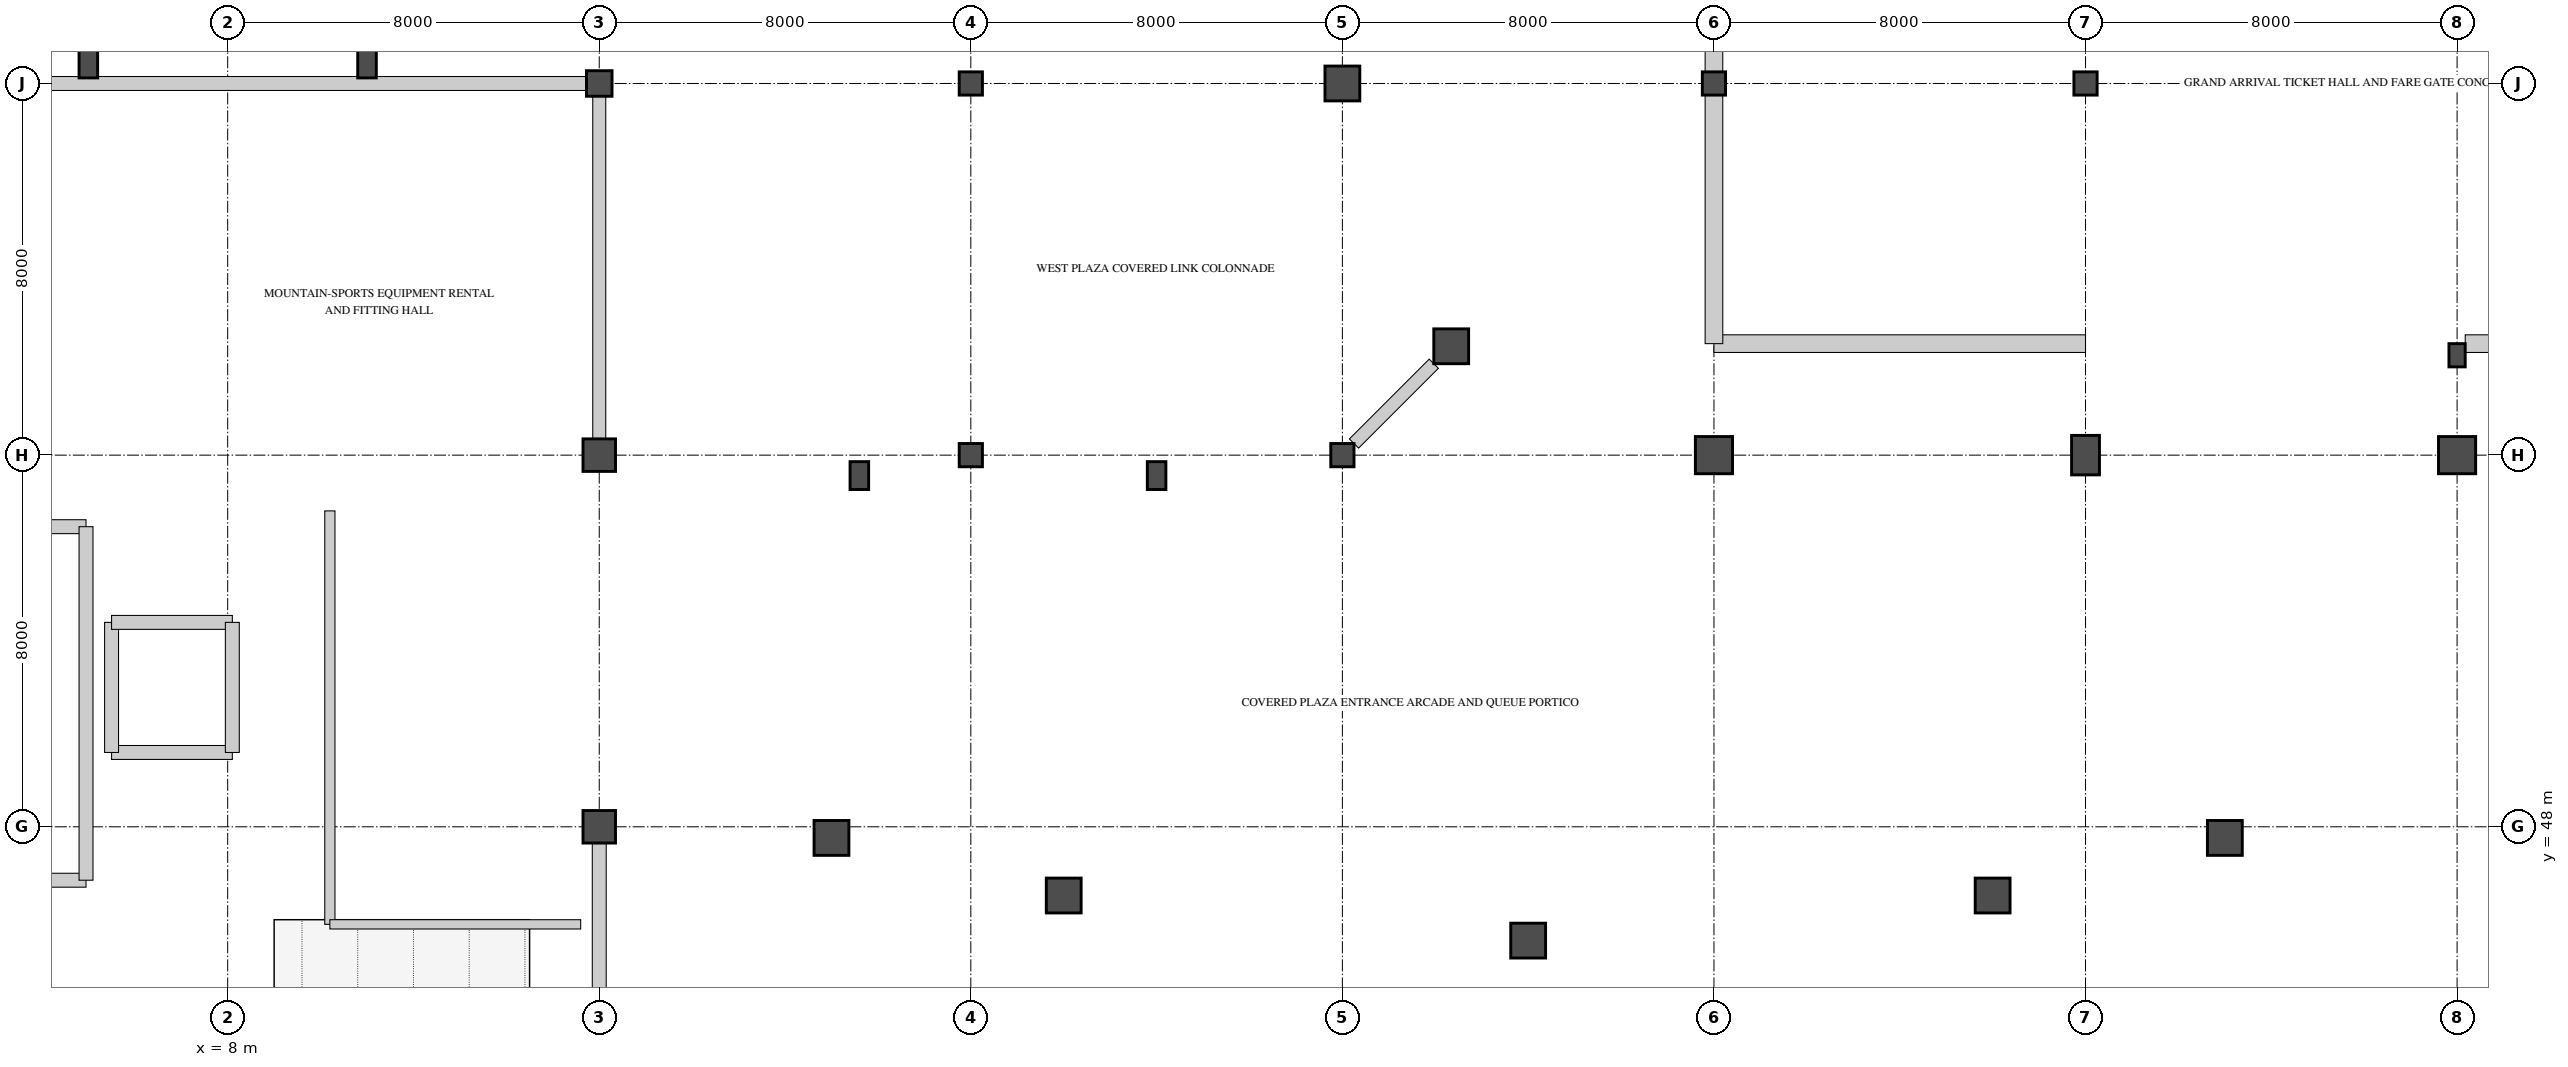
"""IFC4 building model, lengths in metres.
Left out: names, types, materials, properties, quantities, classifications, styles, units other than length and angle.
Written with IfcOpenShell. Run it as: python <this file> out.ifc"""

import sys

from ifc_helpers import new_model, si_unit, direction, frame, frame_2d, origin, origin_2d, place, context, subcontext, project, spatial, rectangle, circle, extrude, element, fill, save


model = new_model("IFC4")
c1 = context("Model", 3, precision=1e-05, world=origin(), true_north=direction((0.0, 1.0)))
c2 = subcontext(c1, "Body", "Model", "MODEL_VIEW")
j1 = project(units=[si_unit("LENGTHUNIT", "METRE"), si_unit("PLANEANGLEUNIT", "RADIAN")], contexts=[c1])
p1 = place(None, origin())
s1 = spatial("IfcSite", under=j1, at=p1, CompositionType="ELEMENT")
p2 = place(p1, origin())
s2 = spatial("IfcBuilding", under=s1, at=p2, CompositionType="ELEMENT")
p3 = place(p2, origin())
s3 = spatial("IfcBuildingStorey", under=s2, at=p3, CompositionType="ELEMENT", Elevation=0.0)
p4 = place(p3, frame((40.0, 56.0, 0.0), z_axis=(0.0, 0.0, 1.0), x_axis=(1.0, 0.0, 0.0)))
e1 = element("IfcColumn", 1, at=p4, inside=s3, PredefinedType="COLUMN", context=c2, shape_type="SweptSolid", body=[
    extrude(rectangle(XDim=0.8, YDim=0.8, at=origin_2d()), origin(), (0.0, 0.0, 1.0), 4.8),
])
p5 = place(p3, frame((48.0, 56.0, 0.0), z_axis=(0.0, 0.0, 1.0), x_axis=(1.0, 0.0, 0.0)))
e2 = element("IfcColumn", 2, at=p5, inside=s3, PredefinedType="COLUMN", context=c2, shape_type="SweptSolid", body=[
    extrude(rectangle(XDim=0.6, YDim=0.85, at=origin_2d()), origin(), (0.0, 0.0, 1.0), 4.8),
])
p6 = place(p3, frame((56.0, 56.0, 0.0), z_axis=(0.0, 0.0, 1.0), x_axis=(1.0, 0.0, 0.0)))
e3 = element("IfcColumn", 3, at=p6, inside=s3, PredefinedType="COLUMN", context=c2, shape_type="SweptSolid", body=[
    extrude(rectangle(XDim=0.8, YDim=0.8, at=origin_2d()), origin(), (0.0, 0.0, 1.0), 4.8),
])
for number, where, z_axis, x_axis in (
    (4, (34.343, 58.343, 0.0), (0.0, 0.0, 1.0), (1.0, 0.0, 0.0)),
    (5, (32.0, 64.0, 0.0), (0.0, 0.0, 1.0), (1.0, 0.0, 0.0)),
):
    element("IfcColumn", number, at=place(p3, frame(where, z_axis=z_axis, x_axis=x_axis)), inside=s3, PredefinedType="COLUMN", context=c2, shape_type="SweptSolid", body=[
        extrude(circle(Radius=0.375, at=origin_2d()), origin(), (0.0, 0.0, 1.0), 4.8),
    ])
for number, where, z_axis, x_axis in (
    (6, (16.0, 48.0, 0.0), (0.0, 0.0, 1.0), (1.0, 0.0, 0.0)),
    (7, (16.0, 56.0, 0.0), (0.0, 0.0, 1.0), (1.0, 0.0, 0.0)),
):
    element("IfcColumn", number, at=place(p3, frame(where, z_axis=z_axis, x_axis=x_axis)), inside=s3, PredefinedType="COLUMN", context=c2, shape_type="SweptSolid", body=[
        extrude(rectangle(XDim=0.7, YDim=0.7, at=origin_2d()), origin(), (0.0, 0.0, 1.0), 4.8),
    ])
p7 = place(p3, frame((16.0, 64.0, 0.0), z_axis=(0.0, 0.0, 1.0), x_axis=(1.0, 0.0, 0.0)))
e8 = element("IfcColumn", 8, at=p7, inside=s3, PredefinedType="COLUMN", context=c2, shape_type="SweptSolid", body=[
    extrude(rectangle(XDim=0.55, YDim=0.55, at=origin_2d()), origin(), (0.0, 0.0, 1.0), 4.8),
])
for number, where, z_axis, x_axis in (
    (9, (24.0, 56.0, 0.0), (0.0, 0.0, 1.0), (1.0, 0.0, 0.0)),
    (10, (24.0, 64.0, 0.0), (0.0, 0.0, 1.0), (1.0, 0.0, 0.0)),
    (11, (32.0, 56.0, 0.0), (0.0, 0.0, 1.0), (1.0, 0.0, 0.0)),
    (12, (48.0, 64.0, 0.0), (0.0, 0.0, 1.0), (1.0, 0.0, 0.0)),
):
    element("IfcColumn", number, at=place(p3, frame(where, z_axis=z_axis, x_axis=x_axis)), inside=s3, PredefinedType="COLUMN", context=c2, shape_type="SweptSolid", body=[
        extrude(rectangle(XDim=0.5, YDim=0.5, at=origin_2d()), origin(), (0.0, 0.0, 1.0), 4.8),
    ])
p8 = place(p3, frame((56.0, 58.15, 0.0), z_axis=(0.0, 0.0, 1.0), x_axis=(1.0, 0.0, 0.0)))
e13 = element("IfcColumn", 13, at=p8, inside=s3, PredefinedType="PILASTER", context=c2, shape_type="SweptSolid", body=[
    extrude(rectangle(XDim=0.35, YDim=0.5, at=origin_2d()), origin(), (0.0, 0.0, 1.0), 4.8),
])
for number, where, z_axis, x_axis in (
    (14, (21.6, 55.56, 0.0), (0.0, 0.0, 1.0), (1.0, 0.0, 0.0)),
    (15, (28.0, 55.56, 0.0), (0.0, 0.0, 1.0), (1.0, 0.0, 0.0)),
    (16, (5.0, 64.42, 0.0), (0.0, 0.0, 1.0), (1.0, 0.0, 0.0)),
    (17, (11.0, 64.42, 0.0), (0.0, 0.0, 1.0), (1.0, 0.0, 0.0)),
):
    element("IfcColumn", number, at=place(p3, frame(where, z_axis=z_axis, x_axis=x_axis)), inside=s3, PredefinedType="PILASTER", context=c2, shape_type="SweptSolid", body=[
        extrude(rectangle(XDim=0.4, YDim=0.6, at=origin_2d()), origin(), (0.0, 0.0, 1.0), 4.8),
    ])
p9 = place(p3, frame((40.0, 64.0, 0.0), z_axis=(0.0, 0.0, 1.0), x_axis=(1.0, 0.0, 0.0)))
e18 = element("IfcColumn", 18, at=p9, inside=s3, PredefinedType="COLUMN", context=c2, shape_type="SweptSolid", body=[
    extrude(rectangle(XDim=0.5, YDim=0.5, at=origin_2d()), origin(), (0.0, 0.0, 1.0), 4.8),
])
for number, where, z_axis, x_axis in (
    (19, (21.0, 47.76, 0.0), (0.0, 0.0, 1.0), (1.0, 0.0, 0.0)),
    (20, (26.0, 46.521, 0.0), (0.0, 0.0, 1.0), (1.0, 0.0, 0.0)),
    (21, (36.0, 45.55, 0.0), (0.0, 0.0, 1.0), (1.0, 0.0, 0.0)),
    (22, (46.0, 46.521, 0.0), (0.0, 0.0, 1.0), (1.0, 0.0, 0.0)),
    (23, (51.0, 47.76, 0.0), (0.0, 0.0, 1.0), (1.0, 0.0, 0.0)),
):
    element("IfcColumn", number, at=place(p3, frame(where, z_axis=z_axis, x_axis=x_axis)), inside=s3, PredefinedType="COLUMN", context=c2, shape_type="SweptSolid", body=[
        extrude(circle(Radius=0.375, at=origin_2d()), origin(), (0.0, 0.0, 1.0), 4.56),
    ])
p10 = place(p3, frame((48.0, 58.4, 0.0), z_axis=(0.0, 0.0, 1.0), x_axis=(-1.0, 0.0, 0.0)))
e24 = element("IfcWall", 24, at=p10, inside=s3, PredefinedType="STANDARD", context=c2, shape_type="SweptSolid", body=[
    extrude(rectangle(XDim=8.0, YDim=0.38, at=frame_2d((4.0, 0.0))), origin(), (0.0, 0.0, 1.0), 4.5),
])
p11 = place(p10, frame((2.6, 0.0, 0.0)))
e25 = element("IfcOpeningElement", 25, at=p11, cuts=e24, PredefinedType="OPENING", context=c2, shape_type="SweptSolid", body=[
    extrude(rectangle(XDim=2.8, YDim=2.8, at=frame_2d((1.4, 1.4))), frame((0.0, 0.2, 0.0), z_axis=(0.0, -1.0, 0.0), x_axis=(1.0, 0.0, 0.0)), (0.0, 0.0, 1.0), 0.4),
])
p12 = place(p3, frame((64.0, 58.4, 0.0), z_axis=(0.0, 0.0, 1.0), x_axis=(-1.0, 0.0, 0.0)))
e26 = element("IfcWall", 26, at=p12, inside=s3, PredefinedType="STANDARD", context=c2, shape_type="SweptSolid", body=[
    extrude(rectangle(XDim=7.825, YDim=0.38, at=frame_2d((3.913, 0.0))), origin(), (0.0, 0.0, 1.0), 4.5),
])
p13 = place(p12, frame((2.6, 0.0, 0.0)))
e27 = element("IfcOpeningElement", 27, at=p13, cuts=e26, PredefinedType="OPENING", context=c2, shape_type="SweptSolid", body=[
    extrude(rectangle(XDim=2.0, YDim=2.5, at=frame_2d((1.0, 1.25))), frame((0.0, 0.2, 0.0), z_axis=(0.0, -1.0, 0.0), x_axis=(1.0, 0.0, 0.0)), (0.0, 0.0, 1.0), 0.4),
])
p14 = place(p3, frame((40.0, 58.4, 0.0), z_axis=(0.0, 0.0, 1.0), x_axis=(0.0, 1.0, 0.0)))
e28 = element("IfcWall", 28, at=p14, inside=s3, PredefinedType="STANDARD", context=c2, shape_type="SweptSolid", body=[
    extrude(rectangle(XDim=5.35, YDim=0.38, at=frame_2d((2.675, 0.0))), origin(), (0.0, 0.0, 1.0), 2.85),
])
p15 = place(p14, frame((1.6, 0.0, 0.0)))
e29 = element("IfcOpeningElement", 29, at=p15, cuts=e28, PredefinedType="OPENING", context=c2, shape_type="SweptSolid", body=[
    extrude(rectangle(XDim=1.6, YDim=2.4, at=frame_2d((0.8, 1.2))), frame((0.0, 0.2, 0.0), z_axis=(0.0, -1.0, 0.0), x_axis=(1.0, 0.0, 0.0)), (0.0, 0.0, 1.0), 0.4),
])
p16 = place(p3, frame((40.0, 64.25, 0.0), z_axis=(0.0, 0.0, 1.0), x_axis=(0.0, 1.0, 0.0)))
e30 = element("IfcWall", 30, at=p16, inside=s3, PredefinedType="STANDARD", context=c2, shape_type="SweptSolid", body=[
    extrude(rectangle(XDim=5.35, YDim=0.38, at=frame_2d((2.675, 0.0))), origin(), (0.0, 0.0, 1.0), 2.85),
])
p17 = place(p16, frame((1.115, 0.0, 0.48)))
e31 = element("IfcOpeningElement", 31, at=p17, cuts=e30, PredefinedType="OPENING", context=c2, shape_type="SweptSolid", body=[
    extrude(rectangle(XDim=0.98, YDim=2.15, at=frame_2d((0.49, 1.075))), frame((0.0, 0.2, 0.0), z_axis=(0.0, -1.0, 0.0), x_axis=(1.0, 0.0, 0.0)), (0.0, 0.0, 1.0), 0.4),
])
p18 = place(p16, frame((2.87, 0.0, 0.48)))
e32 = element("IfcOpeningElement", 32, at=p18, cuts=e30, PredefinedType="OPENING", context=c2, shape_type="SweptSolid", body=[
    extrude(rectangle(XDim=1.75, YDim=2.15, at=frame_2d((0.875, 1.075))), frame((0.0, 0.2, 0.0), z_axis=(0.0, -1.0, 0.0), x_axis=(1.0, 0.0, 0.0)), (0.0, 0.0, 1.0), 0.4),
])
p19 = place(p3, frame((16.0, 47.65, 0.0), z_axis=(0.0, 0.0, 1.0), x_axis=(0.0, -1.0, 0.0)))
e33 = element("IfcWall", 33, at=p19, inside=s3, PredefinedType="STANDARD", context=c2, shape_type="SweptSolid", body=[
    extrude(rectangle(XDim=7.3, YDim=0.3, at=frame_2d((3.65, 0.0))), origin(), (0.0, 0.0, 1.0), 3.74),
])
p20 = place(p19, frame((2.4, 0.0, 0.0)))
e34 = element("IfcOpeningElement", 34, at=p20, cuts=e33, PredefinedType="OPENING", context=c2, shape_type="SweptSolid", body=[
    extrude(rectangle(XDim=2.4, YDim=2.7, at=frame_2d((1.2, 1.35))), frame((0.0, 0.16, 0.0), z_axis=(0.0, -1.0, 0.0), x_axis=(1.0, 0.0, 0.0)), (0.0, 0.0, 1.0), 0.32),
])
p21 = place(p3, frame((16.0, 63.725, 0.0), z_axis=(0.0, 0.0, 1.0), x_axis=(0.0, -1.0, 0.0)))
e35 = element("IfcWall", 35, at=p21, inside=s3, PredefinedType="STANDARD", context=c2, shape_type="SweptSolid", body=[
    extrude(rectangle(XDim=7.375, YDim=0.28, at=frame_2d((3.688, 0.0))), origin(), (0.0, 0.0, 1.0), 3.74),
])
p22 = place(p21, frame((2.4, 0.0, 0.0)))
e36 = element("IfcOpeningElement", 36, at=p22, cuts=e35, PredefinedType="OPENING", context=c2, shape_type="SweptSolid", body=[
    extrude(rectangle(XDim=1.6, YDim=2.4, at=frame_2d((0.8, 1.2))), frame((0.0, 0.15, 0.0), z_axis=(0.0, -1.0, 0.0), x_axis=(1.0, 0.0, 0.0)), (0.0, 0.0, 1.0), 0.3),
])
p23 = place(p3, frame((0.275, 64.0, 0.0), z_axis=(0.0, 0.0, 1.0), x_axis=(1.0, 0.0, 0.0)))
e37 = element("IfcWall", 37, at=p23, inside=s3, PredefinedType="STANDARD", context=c2, shape_type="SweptSolid", body=[
    extrude(rectangle(XDim=15.45, YDim=0.3, at=frame_2d((7.725, 0.0))), origin(), (0.0, 0.0, 1.0), 3.09),
])
p24 = place(p23, frame((6.025, 0.0, 0.75)))
e38 = element("IfcOpeningElement", 38, at=p24, cuts=e37, PredefinedType="OPENING", context=c2, shape_type="SweptSolid", body=[
    extrude(rectangle(XDim=3.399, YDim=1.7, at=frame_2d((1.699, 0.85))), frame((0.0, 0.16, 0.0), z_axis=(0.0, -1.0, 0.0), x_axis=(1.0, 0.0, 0.0)), (0.0, 0.0, 1.0), 0.32),
])
p25 = place(p3, frame((33.968, 57.968, 0.0), z_axis=(0.0, 0.0, 1.0), x_axis=(-0.707106781187, -0.707106781187, 0.0)))
e39 = element("IfcWall", 39, at=p25, inside=s3, PredefinedType="STANDARD", context=c2, shape_type="SweptSolid", body=[
    extrude(rectangle(XDim=2.43, YDim=0.28, at=frame_2d((1.215, 0.0))), origin(), (0.0, 0.0, 1.0), 4.5),
])
p26 = place(p3, frame((4.95, 46.85, 0.0), z_axis=(0.0, 0.0, 1.0), x_axis=(-1.0, 0.0, 0.0)))
e40 = element("IfcWall", 40, at=p26, inside=s3, PredefinedType="SHEAR", context=c2, shape_type="SweptSolid", body=[
    extrude(rectangle(XDim=3.78, YDim=0.3, at=frame_2d((1.89, 0.0))), origin(), (0.0, 0.0, 1.0), 4.54),
])
p27 = place(p26, frame((1.34, 0.0, 0.0)))
e41 = element("IfcOpeningElement", 41, at=p27, cuts=e40, PredefinedType="OPENING", context=c2, shape_type="SweptSolid", body=[
    extrude(rectangle(XDim=1.1, YDim=2.2, at=frame_2d((0.55, 1.1))), frame((0.0, 0.16, 0.0), z_axis=(0.0, -1.0, 0.0), x_axis=(1.0, 0.0, 0.0)), (0.0, 0.0, 1.0), 0.32),
])
p28 = place(p3, frame((1.17, 54.46, 0.0), z_axis=(0.0, 0.0, 1.0), x_axis=(1.0, 0.0, 0.0)))
e42 = element("IfcWall", 42, at=p28, inside=s3, PredefinedType="SHEAR", context=c2, shape_type="SweptSolid", body=[
    extrude(rectangle(XDim=3.78, YDim=0.3, at=frame_2d((1.89, 0.0))), origin(), (0.0, 0.0, 1.0), 4.54),
])
p29 = place(p3, frame((4.95, 54.46, 0.0), z_axis=(0.0, 0.0, 1.0), x_axis=(0.0, -1.0, 0.0)))
e43 = element("IfcWall", 43, at=p29, inside=s3, PredefinedType="SHEAR", context=c2, shape_type="SweptSolid", body=[
    extrude(rectangle(XDim=7.61, YDim=0.3, at=frame_2d((3.805, 0.0))), origin(), (0.0, 0.0, 1.0), 4.54),
])
p30 = place(p3, frame((8.1, 49.6, 0.0), z_axis=(0.0, 0.0, 1.0), x_axis=(-1.0, 0.0, 0.0)))
e44 = element("IfcWall", 44, at=p30, inside=s3, PredefinedType="SHEAR", context=c2, shape_type="SweptSolid", body=[
    extrude(rectangle(XDim=2.6, YDim=0.3, at=frame_2d((1.3, 0.0))), origin(), (0.0, 0.0, 1.0), 4.54),
])
p31 = place(p3, frame((5.5, 49.6, 0.0), z_axis=(0.0, 0.0, 1.0), x_axis=(0.0, 1.0, 0.0)))
e45 = element("IfcWall", 45, at=p31, inside=s3, PredefinedType="SHEAR", context=c2, shape_type="SweptSolid", body=[
    extrude(rectangle(XDim=2.8, YDim=0.3, at=frame_2d((1.4, 0.0))), origin(), (0.0, 0.0, 1.0), 4.54),
])
p32 = place(p3, frame((5.5, 52.4, 0.0), z_axis=(0.0, 0.0, 1.0), x_axis=(1.0, 0.0, 0.0)))
e46 = element("IfcWall", 46, at=p32, inside=s3, PredefinedType="SHEAR", context=c2, shape_type="SweptSolid", body=[
    extrude(rectangle(XDim=2.6, YDim=0.3, at=frame_2d((1.3, 0.0))), origin(), (0.0, 0.0, 1.0), 4.54),
])
p33 = place(p3, frame((8.1, 52.4, 0.0), z_axis=(0.0, 0.0, 1.0), x_axis=(0.0, -1.0, 0.0)))
e47 = element("IfcWall", 47, at=p33, inside=s3, PredefinedType="SHEAR", context=c2, shape_type="SweptSolid", body=[
    extrude(rectangle(XDim=2.8, YDim=0.3, at=frame_2d((1.4, 0.0))), origin(), (0.0, 0.0, 1.0), 4.54),
])
p34 = place(p33, frame((0.75, 0.0, 0.0)))
e48 = element("IfcOpeningElement", 48, at=p34, cuts=e47, PredefinedType="OPENING", context=c2, shape_type="SweptSolid", body=[
    extrude(rectangle(XDim=1.3, YDim=2.25, at=frame_2d((0.65, 1.125))), frame((0.0, 0.16, 0.0), z_axis=(0.0, -1.0, 0.0), x_axis=(1.0, 0.0, 0.0)), (0.0, 0.0, 1.0), 0.32),
])
p35 = place(p3, frame((10.2, 45.9, 0.0), z_axis=(0.0, 0.0, 1.0), x_axis=(0.0, 1.0, 0.0)))
e49 = element("IfcWall", 49, at=p35, inside=s3, PredefinedType="PARTITIONING", context=c2, shape_type="SweptSolid", body=[
    extrude(rectangle(XDim=8.9, YDim=0.22, at=frame_2d((4.45, 0.0))), origin(), (0.0, 0.0, 1.0), 3.082),
])
p36 = place(p35, frame((0.9, 0.0, 0.0)))
e50 = element("IfcOpeningElement", 50, at=p36, cuts=e49, PredefinedType="OPENING", context=c2, shape_type="SweptSolid", body=[
    extrude(rectangle(XDim=1.1, YDim=2.2, at=frame_2d((0.55, 1.1))), frame((0.0, 0.12, 0.0), z_axis=(0.0, -1.0, 0.0), x_axis=(1.0, 0.0, 0.0)), (0.0, 0.0, 1.0), 0.24),
])
p37 = place(p3, frame((10.2, 45.9, 0.0), z_axis=(0.0, 0.0, 1.0), x_axis=(1.0, 0.0, 0.0)))
e51 = element("IfcWall", 51, at=p37, inside=s3, PredefinedType="PARTITIONING", context=c2, shape_type="SweptSolid", body=[
    extrude(rectangle(XDim=5.4, YDim=0.2, at=frame_2d((2.7, 0.0))), origin(), (0.0, 0.0, 1.0), 3.732),
])
p38 = place(p11, origin())
e52 = element("IfcDoor", 52, at=p38, inside=s3, OperationType="DOUBLE_DOOR_SINGLE_SWING", PredefinedType="DOOR", context=c2, shape_type="SweptSolid", body=[
    extrude(rectangle(XDim=2.8, YDim=2.8, at=frame_2d((1.4, 1.4))), frame((0.0, 0.025, 0.0), z_axis=(0.0, -1.0, 0.0), x_axis=(1.0, 0.0, 0.0)), (0.0, 0.0, 1.0), 0.05),
])
fill(e25, e52)
p39 = place(p15, origin())
e53 = element("IfcDoor", 53, at=p39, inside=s3, OperationType="DOUBLE_DOOR_SINGLE_SWING", PredefinedType="DOOR", context=c2, shape_type="SweptSolid", body=[
    extrude(rectangle(XDim=1.6, YDim=2.4, at=frame_2d((0.8, 1.2))), frame((0.0, 0.025, 0.0), z_axis=(0.0, -1.0, 0.0), x_axis=(1.0, 0.0, 0.0)), (0.0, 0.0, 1.0), 0.05),
])
fill(e29, e53)
p40 = place(p20, origin())
e54 = element("IfcDoor", 54, at=p40, inside=s3, OperationType="DOUBLE_DOOR_SINGLE_SWING", PredefinedType="DOOR", context=c2, shape_type="SweptSolid", body=[
    extrude(rectangle(XDim=2.4, YDim=2.7, at=frame_2d((1.2, 1.35))), frame((0.0, 0.025, 0.0), z_axis=(0.0, -1.0, 0.0), x_axis=(1.0, 0.0, 0.0)), (0.0, 0.0, 1.0), 0.05),
])
fill(e34, e54)
p41 = place(p22, origin())
e55 = element("IfcDoor", 55, at=p41, inside=s3, OperationType="DOUBLE_DOOR_SINGLE_SWING", PredefinedType="DOOR", context=c2, shape_type="SweptSolid", body=[
    extrude(rectangle(XDim=1.6, YDim=2.4, at=frame_2d((0.8, 1.2))), frame((0.0, 0.025, 0.0), z_axis=(0.0, -1.0, 0.0), x_axis=(1.0, 0.0, 0.0)), (0.0, 0.0, 1.0), 0.05),
])
fill(e36, e55)
p42 = place(p24, origin())
e56 = element("IfcWindow", 56, at=p42, inside=s3, PartitioningType="SINGLE_PANEL", PredefinedType="WINDOW", context=c2, shape_type="SweptSolid", body=[
    extrude(rectangle(XDim=3.399, YDim=1.7, at=frame_2d((1.699, 0.85))), frame((0.0, 0.03, 0.0), z_axis=(0.0, -1.0, 0.0), x_axis=(1.0, 0.0, 0.0)), (0.0, 0.0, 1.0), 0.06),
])
fill(e38, e56)
p43 = place(p34, origin())
e57 = element("IfcDoor", 57, at=p43, inside=s3, OperationType="DOUBLE_DOOR_SLIDING", PredefinedType="DOOR", context=c2, shape_type="SweptSolid", body=[
    extrude(rectangle(XDim=1.3, YDim=2.25, at=frame_2d((0.65, 1.125))), frame((0.0, 0.025, 0.0), z_axis=(0.0, -1.0, 0.0), x_axis=(1.0, 0.0, 0.0)), (0.0, 0.0, 1.0), 0.05),
])
fill(e48, e57)
p44 = place(p36, origin())
e58 = element("IfcDoor", 58, at=p44, inside=s3, OperationType="SINGLE_SWING_LEFT", PredefinedType="DOOR", context=c2, shape_type="SweptSolid", body=[
    extrude(rectangle(XDim=1.1, YDim=2.2, at=frame_2d((0.55, 1.1))), frame((0.0, 0.025, 0.0), z_axis=(0.0, -1.0, 0.0), x_axis=(1.0, 0.0, 0.0)), (0.0, 0.0, 1.0), 0.05),
])
fill(e50, e58)
save(model, sys.argv[1])
